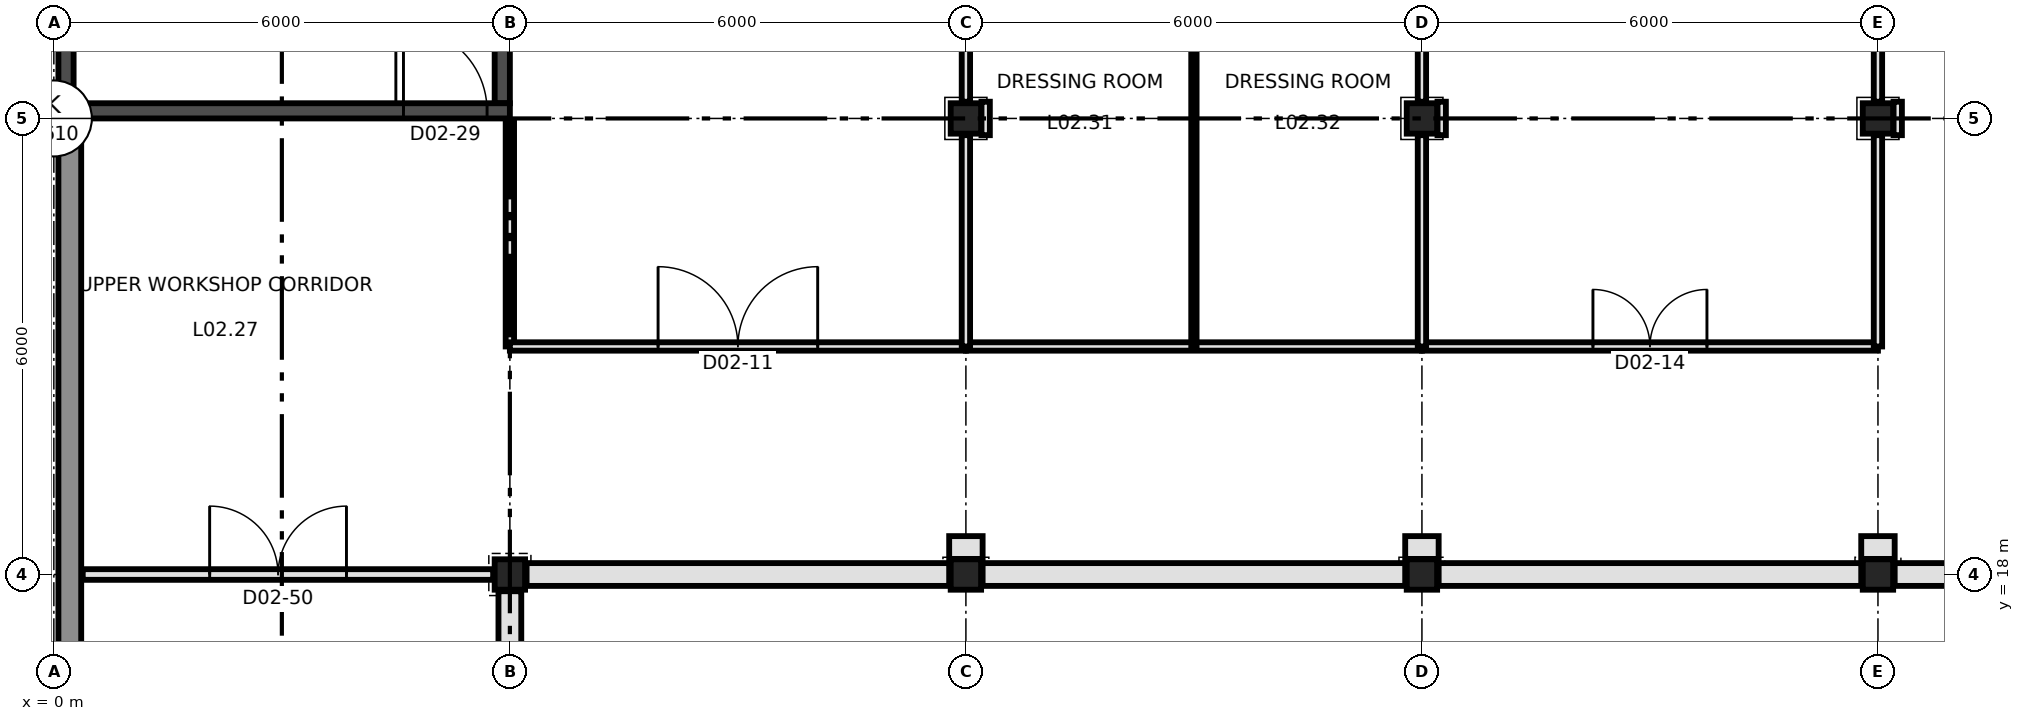
"""IFC4 building model, lengths in metres.
Left out: names, types, materials, properties, quantities, classifications, styles, units other than length and angle.
Written with IfcOpenShell. Run it as: python <this file> out.ifc"""

import sys

from ifc_helpers import new_model, si_unit, direction, frame, frame_2d, origin, origin_2d, place, context, subcontext, project, spatial, rectangle, extrude, element, fill, save


model = new_model("IFC4")
c1 = context("Model", 3, precision=1e-05, world=origin(), true_north=direction((0.0, 1.0)))
c2 = subcontext(c1, "Body", "Model", "MODEL_VIEW")
j1 = project(units=[si_unit("LENGTHUNIT", "METRE"), si_unit("PLANEANGLEUNIT", "RADIAN")], contexts=[c1])
p1 = place(None, origin())
s1 = spatial("IfcSite", under=j1, at=p1, CompositionType="ELEMENT")
p2 = place(p1, origin())
s2 = spatial("IfcBuilding", under=s1, at=p2, CompositionType="ELEMENT")
p3 = place(p2, frame((0.0, 0.0, 12.0)))
s3 = spatial("IfcBuildingStorey", under=s2, at=p3, CompositionType="ELEMENT", Elevation=12.0)
for number, where, z_axis, x_axis in (
    (1, (6.0, 18.0, 0.0), (0.0, 0.0, 1.0), (1.0, 0.0, 0.0)),
    (2, (12.0, 18.0, 0.0), (0.0, 0.0, 1.0), (1.0, 0.0, 0.0)),
    (3, (18.0, 18.0, 0.0), (0.0, 0.0, 1.0), (1.0, 0.0, 0.0)),
    (4, (24.0, 18.0, 0.0), (0.0, 0.0, 1.0), (1.0, 0.0, 0.0)),
    (5, (12.0, 24.0, 0.0), (0.0, 0.0, 1.0), (1.0, 0.0, 0.0)),
    (6, (18.0, 24.0, 0.0), (0.0, 0.0, 1.0), (1.0, 0.0, 0.0)),
    (7, (24.0, 24.0, 0.0), (0.0, 0.0, 1.0), (1.0, 0.0, 0.0)),
):
    element("IfcColumn", number, at=place(p3, frame(where, z_axis=z_axis, x_axis=x_axis)), inside=s3, PredefinedType="COLUMN", context=c2, shape_type="SweptSolid", body=[
        extrude(rectangle(XDim=0.4, YDim=0.4, at=origin_2d()), origin(), (0.0, 0.0, 1.0), 4.5),
    ])
p4 = place(p3, frame((0.0, 24.1, 0.0), z_axis=(0.0, 0.0, 1.0), x_axis=(1.0, 0.0, 0.0)))
e8 = element("IfcWall", 8, at=p4, inside=s3, PredefinedType="SHEAR", context=c2, shape_type="SweptSolid", body=[
    extrude(rectangle(XDim=6.0, YDim=0.2, at=frame_2d((3.0, 0.0))), origin(), (0.0, 0.0, 1.0), 4.5),
])
p5 = place(p4, frame((4.6, 0.0, 0.0)))
e9 = element("IfcOpeningElement", 9, at=p5, cuts=e8, PredefinedType="OPENING", context=c2, shape_type="SweptSolid", body=[
    extrude(rectangle(XDim=1.1, YDim=2.2, at=frame_2d((0.55, 1.1))), frame((0.0, 0.11, 0.0), z_axis=(0.0, -1.0, 0.0), x_axis=(1.0, 0.0, 0.0)), (0.0, 0.0, 1.0), 0.22),
])
p6 = place(p3, frame((0.16, 24.2, 0.0), z_axis=(0.0, 0.0, 1.0), x_axis=(0.0, 1.0, 0.0)))
e10 = element("IfcWall", 10, at=p6, inside=s3, PredefinedType="SHEAR", context=c2, shape_type="SweptSolid", body=[
    extrude(rectangle(XDim=5.6, YDim=0.2, at=frame_2d((2.8, 0.0))), origin(), (0.0, 0.0, 1.0), 4.5),
])
p7 = place(p6, frame((2.55, 0.0, 0.9)))
e11 = element("IfcOpeningElement", 11, at=p7, cuts=e10, PredefinedType="OPENING", context=c2, shape_type="SweptSolid", body=[
    extrude(rectangle(XDim=0.5, YDim=2.1, at=frame_2d((0.25, 1.05))), frame((0.0, 0.11, 0.0), z_axis=(0.0, -1.0, 0.0), x_axis=(1.0, 0.0, 0.0)), (0.0, 0.0, 1.0), 0.22),
])
p8 = place(p3, frame((5.9, 24.2, 0.0), z_axis=(0.0, 0.0, 1.0), x_axis=(0.0, 1.0, 0.0)))
e12 = element("IfcWall", 12, at=p8, inside=s3, PredefinedType="SHEAR", context=c2, shape_type="SweptSolid", body=[
    extrude(rectangle(XDim=5.6, YDim=0.2, at=frame_2d((2.8, 0.0))), origin(), (0.0, 0.0, 1.0), 4.5),
])
p9 = place(p3, frame((0.21, 6.0, 0.0), z_axis=(0.0, 0.0, 1.0), x_axis=(0.0, 1.0, 0.0)))
e13 = element("IfcWall", 13, at=p9, inside=s3, PredefinedType="SOLIDWALL", context=c2, shape_type="SweptSolid", body=[
    extrude(rectangle(XDim=18.0, YDim=0.3, at=frame_2d((9.0, 0.0))), origin(), (0.0, 0.0, 1.0), 4.5),
])
p10 = place(p3, frame((6.0, 21.0, 0.0), z_axis=(0.0, 0.0, 1.0), x_axis=(0.0, 1.0, 0.0)))
e14 = element("IfcWall", 14, at=p10, inside=s3, PredefinedType="PARTITIONING", context=c2, shape_type="SweptSolid", body=[
    extrude(rectangle(XDim=2.98, YDim=0.11, at=frame_2d((1.49, 0.0))), origin(), (0.0, 0.0, 1.0), 3.9),
])
p11 = place(p3, frame((6.0, 21.0, 0.0), z_axis=(0.0, 0.0, 1.0), x_axis=(1.0, 0.0, 0.0)))
e15 = element("IfcWall", 15, at=p11, inside=s3, PredefinedType="PARTITIONING", context=c2, shape_type="SweptSolid", body=[
    extrude(rectangle(XDim=6.0, YDim=0.11, at=frame_2d((3.0, 0.0))), origin(), (0.0, 0.0, 1.0), 3.9),
])
p12 = place(p11, frame((1.95, 0.0, 0.0)))
e16 = element("IfcOpeningElement", 16, at=p12, cuts=e15, PredefinedType="OPENING", context=c2, shape_type="SweptSolid", body=[
    extrude(rectangle(XDim=2.1, YDim=2.4, at=frame_2d((1.05, 1.2))), frame((0.0, 0.065, 0.0), z_axis=(0.0, -1.0, 0.0), x_axis=(1.0, 0.0, 0.0)), (0.0, 0.0, 1.0), 0.13),
])
p13 = place(p3, frame((12.0, 21.0, 0.0), z_axis=(0.0, 0.0, 1.0), x_axis=(1.0, 0.0, 0.0)))
e17 = element("IfcWall", 17, at=p13, inside=s3, PredefinedType="PARTITIONING", context=c2, shape_type="SweptSolid", body=[
    extrude(rectangle(XDim=6.0, YDim=0.11, at=frame_2d((3.0, 0.0))), origin(), (0.0, 0.0, 1.0), 4.28),
])
p14 = place(p3, frame((12.0, 24.22, 0.0), z_axis=(0.0, 0.0, 1.0), x_axis=(0.0, 1.0, 0.0)))
e18 = element("IfcWall", 18, at=p14, inside=s3, PredefinedType="PARTITIONING", context=c2, shape_type="SweptSolid", body=[
    extrude(rectangle(XDim=5.535, YDim=0.11, at=frame_2d((2.768, 0.0))), origin(), (0.0, 0.0, 1.0), 4.28),
])
p15 = place(p3, frame((12.0, 21.0, 0.0), z_axis=(0.0, 0.0, 1.0), x_axis=(0.0, 1.0, 0.0)))
e19 = element("IfcWall", 19, at=p15, inside=s3, PredefinedType="PARTITIONING", context=c2, shape_type="SweptSolid", body=[
    extrude(rectangle(XDim=2.78, YDim=0.11, at=frame_2d((1.39, 0.0))), origin(), (0.0, 0.0, 1.0), 4.28),
])
p16 = place(p3, frame((12.26, 23.78, 0.0), z_axis=(0.0, 0.0, 1.0), x_axis=(0.0, 1.0, 0.0)))
e20 = element("IfcWall", 20, at=p16, inside=s3, PredefinedType="PARTITIONING", context=c2, shape_type="SweptSolid", body=[
    extrude(rectangle(XDim=0.44, YDim=0.11, at=frame_2d((0.22, 0.0))), origin(), (0.0, 0.0, 1.0), 4.28),
])
p17 = place(p3, frame((18.0, 21.0, 0.0), z_axis=(0.0, 0.0, 1.0), x_axis=(1.0, 0.0, 0.0)))
e21 = element("IfcWall", 21, at=p17, inside=s3, PredefinedType="PARTITIONING", context=c2, shape_type="SweptSolid", body=[
    extrude(rectangle(XDim=6.0, YDim=0.11, at=frame_2d((3.0, 0.0))), origin(), (0.0, 0.0, 1.0), 4.28),
])
p18 = place(p17, frame((2.25, 0.0, 0.0)))
e22 = element("IfcOpeningElement", 22, at=p18, cuts=e21, PredefinedType="OPENING", context=c2, shape_type="SweptSolid", body=[
    extrude(rectangle(XDim=1.5, YDim=2.1, at=frame_2d((0.75, 1.05))), frame((0.0, 0.065, 0.0), z_axis=(0.0, -1.0, 0.0), x_axis=(1.0, 0.0, 0.0)), (0.0, 0.0, 1.0), 0.13),
])
p19 = place(p3, frame((24.0, 21.0, 0.0), z_axis=(0.0, 0.0, 1.0), x_axis=(0.0, 1.0, 0.0)))
e23 = element("IfcWall", 23, at=p19, inside=s3, PredefinedType="PARTITIONING", context=c2, shape_type="SweptSolid", body=[
    extrude(rectangle(XDim=2.78, YDim=0.11, at=frame_2d((1.39, 0.0))), origin(), (0.0, 0.0, 1.0), 4.28),
])
p20 = place(p3, frame((24.0, 24.22, 0.0), z_axis=(0.0, 0.0, 1.0), x_axis=(0.0, 1.0, 0.0)))
e24 = element("IfcWall", 24, at=p20, inside=s3, PredefinedType="PARTITIONING", context=c2, shape_type="SweptSolid", body=[
    extrude(rectangle(XDim=1.36, YDim=0.11, at=frame_2d((0.68, 0.0))), origin(), (0.0, 0.0, 1.0), 4.28),
])
p21 = place(p3, frame((24.26, 23.78, 0.0), z_axis=(0.0, 0.0, 1.0), x_axis=(0.0, 1.0, 0.0)))
e25 = element("IfcWall", 25, at=p21, inside=s3, PredefinedType="PARTITIONING", context=c2, shape_type="SweptSolid", body=[
    extrude(rectangle(XDim=0.44, YDim=0.11, at=frame_2d((0.22, 0.0))), origin(), (0.0, 0.0, 1.0), 4.28),
])
p22 = place(p3, frame((18.0, 24.22, 0.0), z_axis=(0.0, 0.0, 1.0), x_axis=(0.0, 1.0, 0.0)))
e26 = element("IfcWall", 26, at=p22, inside=s3, PredefinedType="PARTITIONING", context=c2, shape_type="SweptSolid", body=[
    extrude(rectangle(XDim=5.76, YDim=0.11, at=frame_2d((2.88, 0.0))), origin(), (0.0, 0.0, 1.0), 3.55),
])
p23 = place(p3, frame((18.0, 21.0, 0.0), z_axis=(0.0, 0.0, 1.0), x_axis=(0.0, 1.0, 0.0)))
e27 = element("IfcWall", 27, at=p23, inside=s3, PredefinedType="PARTITIONING", context=c2, shape_type="SweptSolid", body=[
    extrude(rectangle(XDim=2.78, YDim=0.11, at=frame_2d((1.39, 0.0))), origin(), (0.0, 0.0, 1.0), 4.28),
])
p24 = place(p3, frame((18.26, 23.78, 0.0), z_axis=(0.0, 0.0, 1.0), x_axis=(0.0, 1.0, 0.0)))
e28 = element("IfcWall", 28, at=p24, inside=s3, PredefinedType="PARTITIONING", context=c2, shape_type="SweptSolid", body=[
    extrude(rectangle(XDim=0.44, YDim=0.11, at=frame_2d((0.22, 0.0))), origin(), (0.0, 0.0, 1.0), 4.28),
])
p25 = place(p3, frame((0.38, 18.0, 0.0), z_axis=(0.0, 0.0, 1.0), x_axis=(1.0, 0.0, 0.0)))
e29 = element("IfcWall", 29, at=p25, inside=s3, PredefinedType="PARTITIONING", context=c2, shape_type="SweptSolid", body=[
    extrude(rectangle(XDim=5.4, YDim=0.14, at=frame_2d((2.7, 0.0))), origin(), (0.0, 0.0, 1.0), 4.28),
])
p26 = place(p25, frame((1.67, 0.0, 0.0)))
e30 = element("IfcOpeningElement", 30, at=p26, cuts=e29, PredefinedType="OPENING", context=c2, shape_type="SweptSolid", body=[
    extrude(rectangle(XDim=1.8, YDim=2.1, at=frame_2d((0.9, 1.05))), frame((0.0, 0.08, 0.0), z_axis=(0.0, -1.0, 0.0), x_axis=(1.0, 0.0, 0.0)), (0.0, 0.0, 1.0), 0.16),
])
p27 = place(p3, frame((15.0, 21.0, 0.0), z_axis=(0.0, 0.0, 1.0), x_axis=(0.0, 1.0, 0.0)))
e31 = element("IfcWall", 31, at=p27, inside=s3, PredefinedType="PARTITIONING", context=c2, shape_type="SweptSolid", body=[
    extrude(rectangle(XDim=9.0, YDim=0.07, at=frame_2d((4.5, 0.0))), origin(), (0.0, 0.0, 1.0), 3.55),
])
for number, where, z_axis, x_axis in (
    (32, (24.22, 18.0, 0.0), (0.0, 0.0, 1.0), (1.0, 0.0, 0.0)),
    (33, (18.22, 18.0, 0.0), (0.0, 0.0, 1.0), (1.0, 0.0, 0.0)),
    (34, (12.22, 18.0, 0.0), (0.0, 0.0, 1.0), (1.0, 0.0, 0.0)),
    (35, (6.22, 18.0, 0.0), (0.0, 0.0, 1.0), (1.0, 0.0, 0.0)),
):
    element("IfcWall", number, at=place(p3, frame(where, z_axis=z_axis, x_axis=x_axis)), inside=s3, PredefinedType="PARTITIONING", context=c2, shape_type="SweptSolid", body=[
        extrude(rectangle(XDim=5.56, YDim=0.3, at=frame_2d((2.78, 0.0))), origin(), (0.0, 0.0, 1.0), 3.9),
    ])
for number, where, z_axis, x_axis in (
    (36, (23.78, 18.355, 0.0), (0.0, 0.0, 1.0), (1.0, 0.0, 0.0)),
    (37, (17.78, 18.355, 0.0), (0.0, 0.0, 1.0), (1.0, 0.0, 0.0)),
    (38, (11.78, 18.355, 0.0), (0.0, 0.0, 1.0), (1.0, 0.0, 0.0)),
):
    element("IfcWall", number, at=place(p3, frame(where, z_axis=z_axis, x_axis=x_axis)), inside=s3, PredefinedType="PARTITIONING", context=c2, shape_type="SweptSolid", body=[
        extrude(rectangle(XDim=0.44, YDim=0.3, at=frame_2d((0.22, 0.0))), origin(), (0.0, 0.0, 1.0), 4.28),
    ])
p28 = place(p3, frame((6.0, 12.22, 0.0), z_axis=(0.0, 0.0, 1.0), x_axis=(0.0, 1.0, 0.0)))
e39 = element("IfcWall", 39, at=p28, inside=s3, PredefinedType="PARTITIONING", context=c2, shape_type="SweptSolid", body=[
    extrude(rectangle(XDim=5.56, YDim=0.3, at=frame_2d((2.78, 0.0))), origin(), (0.0, 0.0, 1.0), 3.9),
])
p29 = place(p12, origin())
e40 = element("IfcDoor", 40, at=p29, inside=s3, OperationType="DOUBLE_DOOR_SINGLE_SWING", PredefinedType="DOOR", context=c2, shape_type="SweptSolid", body=[
    extrude(rectangle(XDim=2.1, YDim=2.4, at=frame_2d((1.05, 1.2))), frame((0.0, 0.025, 0.0), z_axis=(0.0, -1.0, 0.0), x_axis=(1.0, 0.0, 0.0)), (0.0, 0.0, 1.0), 0.05),
])
fill(e16, e40)
p30 = place(p18, origin())
e41 = element("IfcDoor", 41, at=p30, inside=s3, OperationType="DOUBLE_DOOR_SINGLE_SWING", PredefinedType="DOOR", context=c2, shape_type="SweptSolid", body=[
    extrude(rectangle(XDim=1.5, YDim=2.1, at=frame_2d((0.75, 1.05))), frame((0.0, 0.025, 0.0), z_axis=(0.0, -1.0, 0.0), x_axis=(1.0, 0.0, 0.0)), (0.0, 0.0, 1.0), 0.05),
])
fill(e22, e41)
p31 = place(p5, origin())
e42 = element("IfcDoor", 42, at=p31, inside=s3, OperationType="SINGLE_SWING_LEFT", PredefinedType="DOOR", context=c2, shape_type="SweptSolid", body=[
    extrude(rectangle(XDim=1.1, YDim=2.2, at=frame_2d((0.55, 1.1))), frame((0.0, 0.025, 0.0), z_axis=(0.0, -1.0, 0.0), x_axis=(1.0, 0.0, 0.0)), (0.0, 0.0, 1.0), 0.05),
])
fill(e9, e42)
p32 = place(p26, frame((1.8, 0.0, 0.0), z_axis=(0.0, 0.0, 1.0), x_axis=(-1.0, 0.0, 0.0)))
e43 = element("IfcDoor", 43, at=p32, inside=s3, OperationType="DOUBLE_DOOR_SINGLE_SWING", PredefinedType="DOOR", context=c2, shape_type="SweptSolid", body=[
    extrude(rectangle(XDim=1.8, YDim=2.1, at=frame_2d((0.9, 1.05))), frame((0.0, 0.025, 0.0), z_axis=(0.0, -1.0, 0.0), x_axis=(1.0, 0.0, 0.0)), (0.0, 0.0, 1.0), 0.05),
])
fill(e30, e43)
save(model, sys.argv[1])
